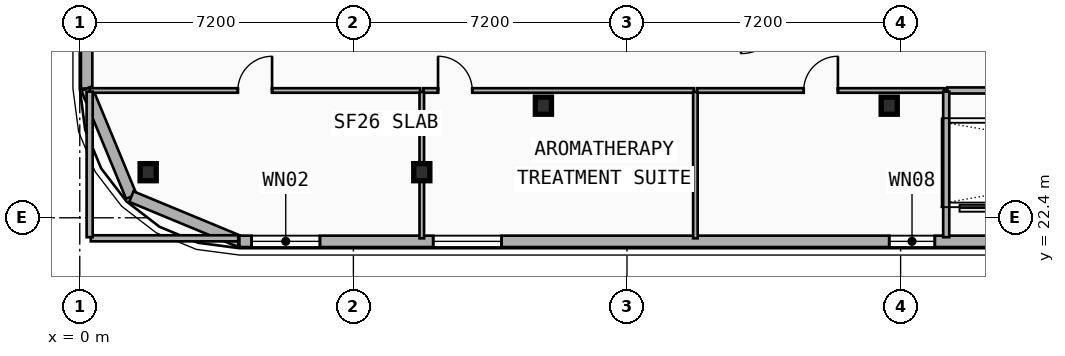
"""IFC4 building model, lengths in metres.
Left out: names, types, materials, properties, quantities, classifications, styles, units other than length and angle.
Written with IfcOpenShell. Run it as: python <this file> out.ifc"""

import sys

from ifc_helpers import new_model, si_unit, direction, frame, frame_2d, origin, origin_2d, place, context, subcontext, project, spatial, rectangle, i_section, extrude, element, fill, save


model = new_model("IFC4")
c1 = context("Model", 3, precision=1e-05, world=origin(), true_north=direction((0.0, 1.0)))
c2 = subcontext(c1, "Body", "Model", "MODEL_VIEW")
j1 = project(units=[si_unit("LENGTHUNIT", "METRE"), si_unit("PLANEANGLEUNIT", "RADIAN")], contexts=[c1])
p1 = place(None, origin())
s1 = spatial("IfcSite", under=j1, at=p1, CompositionType="ELEMENT")
p2 = place(p1, origin())
s2 = spatial("IfcBuilding", under=s1, at=p2, CompositionType="ELEMENT")
p3 = place(p2, frame((0.0, 0.0, 71.0)))
s3 = spatial("IfcBuildingStorey", under=s2, at=p3, CompositionType="ELEMENT", Elevation=71.0)
for number, where, z_axis, x_axis in (
    (1, (12.2, 25.35, 0.0), (0.0, 0.0, 1.0), (1.0, 0.0, 0.0)),
    (2, (21.3, 25.35, 0.0), (0.0, 0.0, 1.0), (1.0, 0.0, 0.0)),
    (3, (9.0, 23.6, 0.0), (0.0, 0.0, 1.0), (1.0, 0.0, 0.0)),
    (4, (1.8, 23.6, 0.0), (0.0, 0.0, 1.0), (1.0, 0.0, 0.0)),
):
    element("IfcColumn", number, at=place(p3, frame(where, z_axis=z_axis, x_axis=x_axis)), inside=s3, PredefinedType="COLUMN", context=c2, shape_type="SweptSolid", body=[
        extrude(i_section(OverallWidth=0.424, OverallDepth=0.45, WebThickness=0.041, FlangeThickness=0.065, FilletRadius=0.015, at=origin_2d()), origin(), (0.0, 0.0, 1.0), 3.5),
    ])
p4 = place(p3, frame((0.18, 25.8, 0.0), z_axis=(0.0, 0.0, 1.0), x_axis=(0.0, 1.0, 0.0)))
e5 = element("IfcWall", 5, at=p4, inside=s3, PredefinedType="SOLIDWALL", context=c2, shape_type="SweptSolid", body=[
    extrude(rectangle(XDim=15.2, YDim=0.3, at=frame_2d((7.6, 0.0))), origin(), (0.0, 0.0, 1.0), 3.18),
])
p5 = place(p4, frame((2.7, 0.0, 0.48)))
e6 = element("IfcOpeningElement", 6, at=p5, cuts=e5, PredefinedType="OPENING", context=c2, shape_type="SweptSolid", body=[
    extrude(rectangle(XDim=1.4, YDim=1.8, at=frame_2d((0.7, 0.9))), frame((0.0, 0.16, 0.0), z_axis=(0.0, -1.0, 0.0), x_axis=(1.0, 0.0, 0.0)), (0.0, 0.0, 1.0), 0.32),
])
p6 = place(p4, frame((4.7, 0.0, 0.48)))
e7 = element("IfcOpeningElement", 7, at=p6, cuts=e5, PredefinedType="OPENING", context=c2, shape_type="SweptSolid", body=[
    extrude(rectangle(XDim=1.4, YDim=1.8, at=frame_2d((0.7, 0.9))), frame((0.0, 0.16, 0.0), z_axis=(0.0, -1.0, 0.0), x_axis=(1.0, 0.0, 0.0)), (0.0, 0.0, 1.0), 0.32),
])
p7 = place(p4, frame((7.867, 0.0, 0.48)))
e8 = element("IfcOpeningElement", 8, at=p7, cuts=e5, PredefinedType="OPENING", context=c2, shape_type="SweptSolid", body=[
    extrude(rectangle(XDim=1.4, YDim=1.8, at=frame_2d((0.7, 0.9))), frame((0.0, 0.16, 0.0), z_axis=(0.0, -1.0, 0.0), x_axis=(1.0, 0.0, 0.0)), (0.0, 0.0, 1.0), 0.32),
])
p8 = place(p4, frame((9.833, 0.0, 0.48)))
e9 = element("IfcOpeningElement", 9, at=p8, cuts=e5, PredefinedType="OPENING", context=c2, shape_type="SweptSolid", body=[
    extrude(rectangle(XDim=1.4, YDim=1.8, at=frame_2d((0.7, 0.9))), frame((0.0, 0.16, 0.0), z_axis=(0.0, -1.0, 0.0), x_axis=(1.0, 0.0, 0.0)), (0.0, 0.0, 1.0), 0.32),
])
p9 = place(p3, frame((1.357, 22.958, 0.0), z_axis=(0.0, 0.0, 1.0), x_axis=(-0.382704529509, 0.923870793506, 0.0)))
e10 = element("IfcWall", 10, at=p9, inside=s3, PredefinedType="SOLIDWALL", context=c2, shape_type="SweptSolid", body=[
    extrude(rectangle(XDim=3.077, YDim=0.3, at=frame_2d((1.538, 0.0))), origin(), (0.0, 0.0, 1.0), 3.18),
])
p10 = place(p3, frame((4.2, 21.78, 0.0), z_axis=(0.0, 0.0, 1.0), x_axis=(-0.923870793506, 0.382704529509, 0.0)))
e11 = element("IfcWall", 11, at=p10, inside=s3, PredefinedType="SOLIDWALL", context=c2, shape_type="SweptSolid", body=[
    extrude(rectangle(XDim=3.077, YDim=0.3, at=frame_2d((1.538, 0.0))), origin(), (0.0, 0.0, 1.0), 2.66),
])
p11 = place(p3, frame((53.4, 21.78, 0.0), z_axis=(0.0, 0.0, 1.0), x_axis=(-1.0, 0.0, 0.0)))
e12 = element("IfcWall", 12, at=p11, inside=s3, PredefinedType="SOLIDWALL", context=c2, shape_type="SweptSolid", body=[
    extrude(rectangle(XDim=49.2, YDim=0.3, at=frame_2d((24.6, 0.0))), origin(), (0.0, 0.0, 1.0), 2.66),
])
p12 = place(p11, frame((47.08, 0.0, 0.68)))
e13 = element("IfcOpeningElement", 13, at=p12, cuts=e12, PredefinedType="OPENING", context=c2, shape_type="SweptSolid", body=[
    extrude(rectangle(XDim=1.8, YDim=1.8, at=frame_2d((0.9, 0.9))), frame((0.0, 0.16, 0.0), z_axis=(0.0, -1.0, 0.0), x_axis=(1.0, 0.0, 0.0)), (0.0, 0.0, 1.0), 0.32),
])
p13 = place(p11, frame((42.3, 0.0, 0.68)))
e14 = element("IfcOpeningElement", 14, at=p13, cuts=e12, PredefinedType="OPENING", context=c2, shape_type="SweptSolid", body=[
    extrude(rectangle(XDim=1.8, YDim=1.8, at=frame_2d((0.9, 0.9))), frame((0.0, 0.16, 0.0), z_axis=(0.0, -1.0, 0.0), x_axis=(1.0, 0.0, 0.0)), (0.0, 0.0, 1.0), 0.32),
])
p14 = place(p11, frame((30.9, 0.0, 0.48)))
e15 = element("IfcOpeningElement", 15, at=p14, cuts=e12, PredefinedType="OPENING", context=c2, shape_type="SweptSolid", body=[
    extrude(rectangle(XDim=1.2, YDim=1.5, at=frame_2d((0.6, 0.75))), frame((0.0, 0.16, 0.0), z_axis=(0.0, -1.0, 0.0), x_axis=(1.0, 0.0, 0.0)), (0.0, 0.0, 1.0), 0.32),
])
p15 = place(p11, frame((17.1, 0.0, 0.48)))
e16 = element("IfcOpeningElement", 16, at=p15, cuts=e12, PredefinedType="OPENING", context=c2, shape_type="SweptSolid", body=[
    extrude(rectangle(XDim=1.2, YDim=1.5, at=frame_2d((0.6, 0.75))), frame((0.0, 0.16, 0.0), z_axis=(0.0, -1.0, 0.0), x_axis=(1.0, 0.0, 0.0)), (0.0, 0.0, 1.0), 0.32),
])
p16 = place(p11, frame((3.684, 0.0, 0.68)))
e17 = element("IfcOpeningElement", 17, at=p16, cuts=e12, PredefinedType="OPENING", context=c2, shape_type="SweptSolid", body=[
    extrude(rectangle(XDim=1.8, YDim=1.8, at=frame_2d((0.9, 0.9))), frame((0.0, 0.16, 0.0), z_axis=(0.0, -1.0, 0.0), x_axis=(1.0, 0.0, 0.0)), (0.0, 0.0, 1.0), 0.32),
])
p17 = place(p11, frame((0.61, 0.0, 0.68)))
e18 = element("IfcOpeningElement", 18, at=p17, cuts=e12, PredefinedType="OPENING", context=c2, shape_type="SweptSolid", body=[
    extrude(rectangle(XDim=1.8, YDim=1.8, at=frame_2d((0.9, 0.9))), frame((0.0, 0.16, 0.0), z_axis=(0.0, -1.0, 0.0), x_axis=(1.0, 0.0, 0.0)), (0.0, 0.0, 1.0), 0.32),
])
p18 = place(p3, frame((0.26, 25.75, 0.0), z_axis=(0.0, 0.0, 1.0), x_axis=(1.0, 0.0, 0.0)))
e19 = element("IfcWall", 19, at=p18, inside=s3, PredefinedType="PARTITIONING", context=c2, shape_type="SweptSolid", body=[
    extrude(rectangle(XDim=8.7, YDim=0.12, at=frame_2d((4.35, 0.0))), origin(), (0.0, 0.0, 1.0), 2.51),
])
p19 = place(p18, frame((3.9, 0.0, 0.0)))
e20 = element("IfcOpeningElement", 20, at=p19, cuts=e19, PredefinedType="OPENING", context=c2, shape_type="SweptSolid", body=[
    extrude(rectangle(XDim=0.9, YDim=2.1, at=frame_2d((0.45, 1.05))), frame((0.0, 0.07, 0.0), z_axis=(0.0, -1.0, 0.0), x_axis=(1.0, 0.0, 0.0)), (0.0, 0.0, 1.0), 0.14),
])
p20 = place(p3, frame((9.04, 25.75, 0.0), z_axis=(0.0, 0.0, 1.0), x_axis=(1.0, 0.0, 0.0)))
e21 = element("IfcWall", 21, at=p20, inside=s3, PredefinedType="PARTITIONING", context=c2, shape_type="SweptSolid", body=[
    extrude(rectangle(XDim=7.12, YDim=0.12, at=frame_2d((3.56, 0.0))), origin(), (0.0, 0.0, 1.0), 2.25),
])
p21 = place(p20, frame((0.387, 0.0, 0.0)))
e22 = element("IfcOpeningElement", 22, at=p21, cuts=e21, PredefinedType="OPENING", context=c2, shape_type="SweptSolid", body=[
    extrude(rectangle(XDim=0.9, YDim=2.1, at=frame_2d((0.45, 1.05))), frame((0.0, 0.07, 0.0), z_axis=(0.0, -1.0, 0.0), x_axis=(1.0, 0.0, 0.0)), (0.0, 0.0, 1.0), 0.14),
])
p22 = place(p3, frame((16.24, 25.75, 0.0), z_axis=(0.0, 0.0, 1.0), x_axis=(1.0, 0.0, 0.0)))
e23 = element("IfcWall", 23, at=p22, inside=s3, PredefinedType="PARTITIONING", context=c2, shape_type="SweptSolid", body=[
    extrude(rectangle(XDim=6.52, YDim=0.12, at=frame_2d((3.26, 0.0))), origin(), (0.0, 0.0, 1.0), 2.25),
])
p23 = place(p22, frame((2.81, 0.0, 0.0)))
e24 = element("IfcOpeningElement", 24, at=p23, cuts=e23, PredefinedType="OPENING", context=c2, shape_type="SweptSolid", body=[
    extrude(rectangle(XDim=0.9, YDim=2.1, at=frame_2d((0.45, 1.05))), frame((0.0, 0.07, 0.0), z_axis=(0.0, -1.0, 0.0), x_axis=(1.0, 0.0, 0.0)), (0.0, 0.0, 1.0), 0.14),
])
p24 = place(p3, frame((9.0, 21.86, 0.0), z_axis=(0.0, 0.0, 1.0), x_axis=(0.0, 1.0, 0.0)))
e25 = element("IfcWall", 25, at=p24, inside=s3, PredefinedType="PARTITIONING", context=c2, shape_type="SweptSolid", body=[
    extrude(rectangle(XDim=3.85, YDim=0.12, at=frame_2d((1.925, 0.0))), origin(), (0.0, 0.0, 1.0), 2.66),
])
p25 = place(p3, frame((16.2, 21.86, 0.0), z_axis=(0.0, 0.0, 1.0), x_axis=(0.0, 1.0, 0.0)))
e26 = element("IfcWall", 26, at=p25, inside=s3, PredefinedType="PARTITIONING", context=c2, shape_type="SweptSolid", body=[
    extrude(rectangle(XDim=3.85, YDim=0.12, at=frame_2d((1.925, 0.0))), origin(), (0.0, 0.0, 1.0), 2.72),
])
p26 = place(p3, frame((22.83, 25.75, 0.0), z_axis=(0.0, 0.0, 1.0), x_axis=(1.0, 0.0, 0.0)))
e27 = element("IfcWall", 27, at=p26, inside=s3, PredefinedType="PARTITIONING", context=c2, shape_type="SweptSolid", body=[
    extrude(rectangle(XDim=11.94, YDim=0.16, at=frame_2d((5.97, 0.0))), origin(), (0.0, 0.0, 1.0), 3.18),
])
p27 = place(p3, frame((0.29, 21.86, 0.0), z_axis=(0.0, 0.0, 1.0), x_axis=(1.0, 0.0, 0.0)))
e28 = element("IfcWall", 28, at=p27, inside=s3, PredefinedType="PARTITIONING", context=c2, shape_type="SweptSolid", body=[
    extrude(rectangle(XDim=3.88, YDim=0.16, at=frame_2d((1.94, 0.0))), origin(), (0.0, 0.0, 1.0), 2.66),
])
p28 = place(p3, frame((0.26, 21.89, 0.0), z_axis=(0.0, 0.0, 1.0), x_axis=(0.0, 1.0, 0.0)))
e29 = element("IfcWall", 29, at=p28, inside=s3, PredefinedType="PARTITIONING", context=c2, shape_type="SweptSolid", body=[
    extrude(rectangle(XDim=3.83, YDim=0.16, at=frame_2d((1.915, 0.0))), origin(), (0.0, 0.0, 1.0), 3.18),
])
p29 = place(p3, frame((22.8, 21.89, 0.0), z_axis=(0.0, 0.0, 1.0), x_axis=(0.0, 1.0, 0.0)))
e30 = element("IfcWall", 30, at=p29, inside=s3, PredefinedType="PARTITIONING", context=c2, shape_type="SweptSolid", body=[
    extrude(rectangle(XDim=3.83, YDim=0.16, at=frame_2d((1.915, 0.0))), origin(), (0.0, 0.0, 1.0), 2.62),
])
p30 = place(p12, origin())
e31 = element("IfcWindow", 31, at=p30, inside=s3, PartitioningType="SINGLE_PANEL", PredefinedType="WINDOW", context=c2, shape_type="SweptSolid", body=[
    extrude(rectangle(XDim=1.8, YDim=1.8, at=frame_2d((0.9, 0.9))), frame((0.0, 0.03, 0.0), z_axis=(0.0, -1.0, 0.0), x_axis=(1.0, 0.0, 0.0)), (0.0, 0.0, 1.0), 0.06),
])
fill(e13, e31)
p31 = place(p13, origin())
e32 = element("IfcWindow", 32, at=p31, inside=s3, PartitioningType="SINGLE_PANEL", PredefinedType="WINDOW", context=c2, shape_type="SweptSolid", body=[
    extrude(rectangle(XDim=1.8, YDim=1.8, at=frame_2d((0.9, 0.9))), frame((0.0, 0.03, 0.0), z_axis=(0.0, -1.0, 0.0), x_axis=(1.0, 0.0, 0.0)), (0.0, 0.0, 1.0), 0.06),
])
fill(e14, e32)
p32 = place(p14, origin())
e33 = element("IfcWindow", 33, at=p32, inside=s3, PartitioningType="SINGLE_PANEL", PredefinedType="WINDOW", context=c2, shape_type="SweptSolid", body=[
    extrude(rectangle(XDim=1.2, YDim=1.5, at=frame_2d((0.6, 0.75))), frame((0.0, 0.03, 0.0), z_axis=(0.0, -1.0, 0.0), x_axis=(1.0, 0.0, 0.0)), (0.0, 0.0, 1.0), 0.06),
])
fill(e15, e33)
p33 = place(p19, origin())
e34 = element("IfcDoor", 34, at=p33, inside=s3, OperationType="SINGLE_SWING_RIGHT", PredefinedType="DOOR", context=c2, shape_type="SweptSolid", body=[
    extrude(rectangle(XDim=0.9, YDim=2.1, at=frame_2d((0.45, 1.05))), frame((0.0, 0.025, 0.0), z_axis=(0.0, -1.0, 0.0), x_axis=(1.0, 0.0, 0.0)), (0.0, 0.0, 1.0), 0.05),
])
fill(e20, e34)
p34 = place(p21, origin())
e35 = element("IfcDoor", 35, at=p34, inside=s3, OperationType="SINGLE_SWING_LEFT", PredefinedType="DOOR", context=c2, shape_type="SweptSolid", body=[
    extrude(rectangle(XDim=0.9, YDim=2.1, at=frame_2d((0.45, 1.05))), frame((0.0, 0.025, 0.0), z_axis=(0.0, -1.0, 0.0), x_axis=(1.0, 0.0, 0.0)), (0.0, 0.0, 1.0), 0.05),
])
fill(e22, e35)
p35 = place(p23, origin())
e36 = element("IfcDoor", 36, at=p35, inside=s3, OperationType="SINGLE_SWING_RIGHT", PredefinedType="DOOR", context=c2, shape_type="SweptSolid", body=[
    extrude(rectangle(XDim=0.9, YDim=2.1, at=frame_2d((0.45, 1.05))), frame((0.0, 0.025, 0.0), z_axis=(0.0, -1.0, 0.0), x_axis=(1.0, 0.0, 0.0)), (0.0, 0.0, 1.0), 0.05),
])
fill(e24, e36)
save(model, sys.argv[1])
